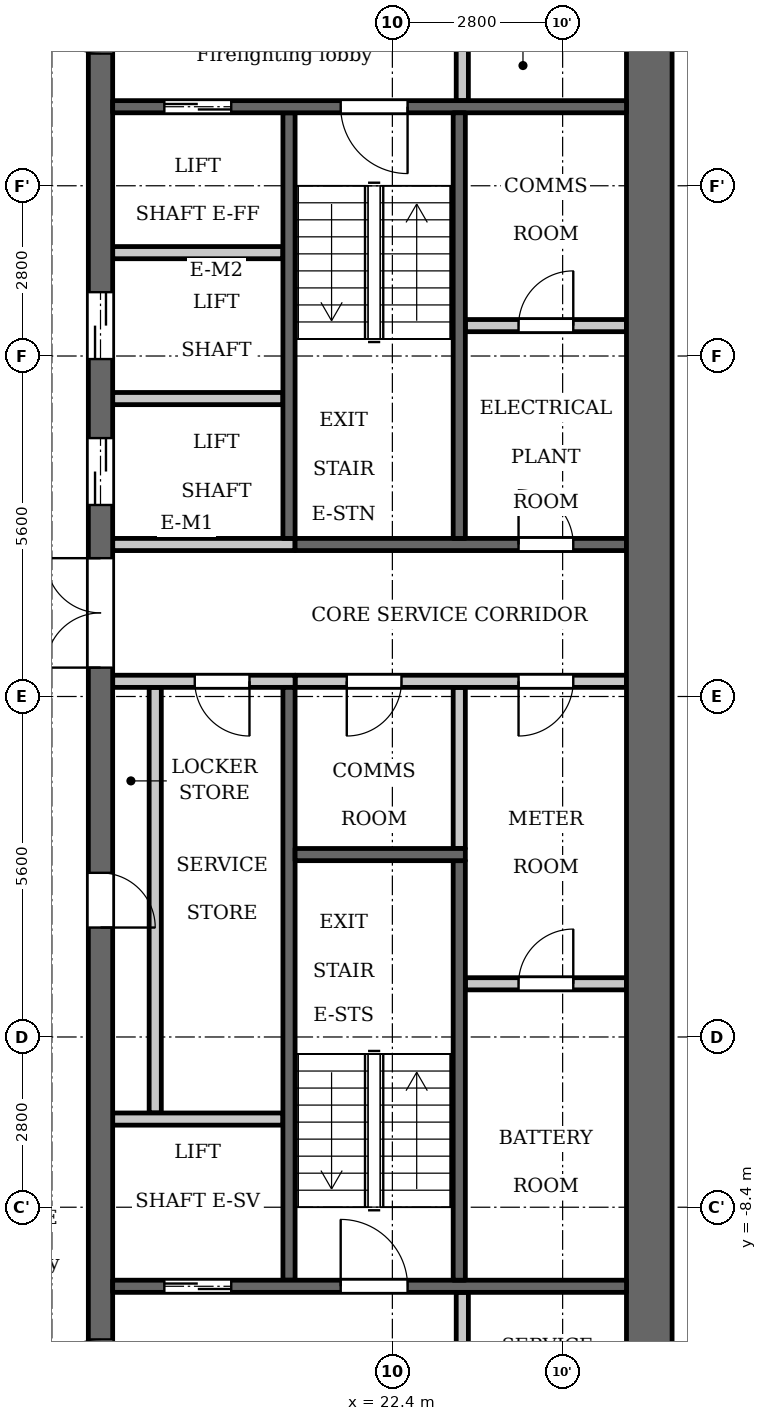
"""IFC4 building model, lengths in metres.
Left out: names, types, materials, properties, quantities, classifications, styles, units other than length and angle.
Written with IfcOpenShell. Run it as: python <this file> out.ifc"""

import sys

from ifc_helpers import new_model, si_unit, direction, frame, frame_2d, origin, place, context, subcontext, project, spatial, rectangle, extrude, element, fill, save


model = new_model("IFC4")
c1 = context("Model", 3, precision=1e-05, world=origin(), true_north=direction((0.0, 1.0)))
c2 = subcontext(c1, "Body", "Model", "MODEL_VIEW")
j1 = project(units=[si_unit("LENGTHUNIT", "METRE"), si_unit("PLANEANGLEUNIT", "RADIAN")], contexts=[c1])
p1 = place(None, origin())
s1 = spatial("IfcSite", under=j1, at=p1, CompositionType="ELEMENT")
p2 = place(p1, origin())
s2 = spatial("IfcBuilding", under=s1, at=p2, CompositionType="ELEMENT")
p3 = place(p2, frame((0.0, 0.0, 160.6)))
s3 = spatial("IfcBuildingStorey", under=s2, at=p3, CompositionType="ELEMENT", Elevation=160.6)
p4 = place(p3, frame((23.5, -2.5, 0.0), z_axis=(0.0, 0.0, 1.0), x_axis=(0.0, 1.0, 0.0)))
e1 = element("IfcWall", 1, at=p4, inside=s3, PredefinedType="PARTITIONING", context=c2, shape_type="SweptSolid", body=[
    extrude(rectangle(XDim=2.65, YDim=0.2, at=frame_2d((1.325, 0.0))), origin(), (0.0, 0.0, 1.0), 3.2),
])
p5 = place(p3, frame((20.7, 2.6, 0.0), z_axis=(0.0, 0.0, 1.0), x_axis=(0.0, 1.0, 0.0)))
e2 = element("IfcWall", 2, at=p5, inside=s3, PredefinedType="SHEAR", context=c2, shape_type="SweptSolid", body=[
    extrude(rectangle(XDim=7.0, YDim=0.2, at=frame_2d((3.5, 0.0))), origin(), (0.0, 0.0, 1.0), 3.2),
])
p6 = place(p3, frame((20.7, -9.6, 0.0), z_axis=(0.0, 0.0, 1.0), x_axis=(0.0, 1.0, 0.0)))
e3 = element("IfcWall", 3, at=p6, inside=s3, PredefinedType="SHEAR", context=c2, shape_type="SweptSolid", body=[
    extrude(rectangle(XDim=9.75, YDim=0.2, at=frame_2d((4.875, 0.0))), origin(), (0.0, 0.0, 1.0), 3.2),
])
p7 = place(p3, frame((20.8, 2.5, 0.0), z_axis=(0.0, 0.0, 1.0), x_axis=(1.0, 0.0, 0.0)))
e4 = element("IfcWall", 4, at=p7, inside=s3, PredefinedType="SHEAR", context=c2, shape_type="SweptSolid", body=[
    extrude(rectangle(XDim=5.45, YDim=0.2, at=frame_2d((2.725, 0.0))), origin(), (0.0, 0.0, 1.0), 3.2),
])
p8 = place(p7, frame((3.675, 0.0, 0.0)))
e5 = element("IfcOpeningElement", 5, at=p8, cuts=e4, PredefinedType="OPENING", context=c2, shape_type="SweptSolid", body=[
    extrude(rectangle(XDim=0.9, YDim=2.1, at=frame_2d((0.45, 1.05))), frame((0.0, 0.11, 0.0), z_axis=(0.0, -1.0, 0.0), x_axis=(1.0, 0.0, 0.0)), (0.0, 0.0, 1.0), 0.22),
])
p9 = place(p3, frame((20.8, 0.25, 0.0), z_axis=(0.0, 0.0, 1.0), x_axis=(1.0, 0.0, 0.0)))
e6 = element("IfcWall", 6, at=p9, inside=s3, PredefinedType="PARTITIONING", context=c2, shape_type="SweptSolid", body=[
    extrude(rectangle(XDim=5.45, YDim=0.2, at=frame_2d((2.725, 0.0))), origin(), (0.0, 0.0, 1.0), 3.2),
])
p10 = place(p9, frame((0.85, 0.0, 0.0)))
e7 = element("IfcOpeningElement", 7, at=p10, cuts=e6, PredefinedType="OPENING", context=c2, shape_type="SweptSolid", body=[
    extrude(rectangle(XDim=0.9, YDim=2.1, at=frame_2d((0.45, 1.05))), frame((0.0, 0.11, 0.0), z_axis=(0.0, -1.0, 0.0), x_axis=(1.0, 0.0, 0.0)), (0.0, 0.0, 1.0), 0.22),
])
p11 = place(p9, frame((3.675, 0.0, 0.0)))
e8 = element("IfcOpeningElement", 8, at=p11, cuts=e6, PredefinedType="OPENING", context=c2, shape_type="SweptSolid", body=[
    extrude(rectangle(XDim=0.9, YDim=2.1, at=frame_2d((0.45, 1.05))), frame((0.0, 0.11, 0.0), z_axis=(0.0, -1.0, 0.0), x_axis=(1.0, 0.0, 0.0)), (0.0, 0.0, 1.0), 0.22),
])
p12 = place(p3, frame((18.5, -6.85, 0.0), z_axis=(0.0, 0.0, 1.0), x_axis=(0.0, 1.0, 0.0)))
e9 = element("IfcWall", 9, at=p12, inside=s3, PredefinedType="PARTITIONING", context=c2, shape_type="SweptSolid", body=[
    extrude(rectangle(XDim=7.0, YDim=0.2, at=frame_2d((3.5, 0.0))), origin(), (0.0, 0.0, 1.0), 3.2),
])
p13 = place(p3, frame((17.6, -12.45, 0.0), z_axis=(0.0, 0.0, 1.0), x_axis=(0.0, 1.0, 0.0)))
e10 = element("IfcWall", 10, at=p13, inside=s3, PredefinedType="SHEAR", context=c2, shape_type="SweptSolid", body=[
    extrude(rectangle(XDim=24.9, YDim=0.4, at=frame_2d((12.45, 0.0))), origin(), (0.0, 0.0, 1.0), 3.2),
])
p14 = place(p13, frame((8.65, 0.0, 0.0)))
e11 = element("IfcOpeningElement", 11, at=p14, cuts=e10, PredefinedType="OPENING", context=c2, shape_type="SweptSolid", body=[
    extrude(rectangle(XDim=0.9, YDim=2.1, at=frame_2d((0.45, 1.05))), frame((0.0, 0.21, 0.0), z_axis=(0.0, -1.0, 0.0), x_axis=(1.0, 0.0, 0.0)), (0.0, 0.0, 1.0), 0.42),
])
p15 = place(p13, frame((15.6, 0.0, 0.0)))
e12 = element("IfcOpeningElement", 12, at=p15, cuts=e10, PredefinedType="OPENING", context=c2, shape_type="SweptSolid", body=[
    extrude(rectangle(XDim=1.1, YDim=2.1, at=frame_2d((0.55, 1.05))), frame((0.0, 0.21, 0.0), z_axis=(0.0, -1.0, 0.0), x_axis=(1.0, 0.0, 0.0)), (0.0, 0.0, 1.0), 0.42),
])
p16 = place(p13, frame((18.0, 0.0, 0.0)))
e13 = element("IfcOpeningElement", 13, at=p16, cuts=e10, PredefinedType="OPENING", context=c2, shape_type="SweptSolid", body=[
    extrude(rectangle(XDim=1.1, YDim=2.1, at=frame_2d((0.55, 1.05))), frame((0.0, 0.21, 0.0), z_axis=(0.0, -1.0, 0.0), x_axis=(1.0, 0.0, 0.0)), (0.0, 0.0, 1.0), 0.42),
])
p17 = place(p13, frame((23.025, 0.0, 0.0)))
e14 = element("IfcOpeningElement", 14, at=p17, cuts=e10, PredefinedType="OPENING", context=c2, shape_type="SweptSolid", body=[
    extrude(rectangle(XDim=1.1, YDim=2.1, at=frame_2d((0.55, 1.05))), frame((0.0, 0.21, 0.0), z_axis=(0.0, -1.0, 0.0), x_axis=(1.0, 0.0, 0.0)), (0.0, 0.0, 1.0), 0.42),
])
p18 = place(p13, frame((0.775, 0.0, 0.0)))
e15 = element("IfcOpeningElement", 15, at=p18, cuts=e10, PredefinedType="OPENING", context=c2, shape_type="SweptSolid", body=[
    extrude(rectangle(XDim=1.1, YDim=2.1, at=frame_2d((0.55, 1.05))), frame((0.0, 0.21, 0.0), z_axis=(0.0, -1.0, 0.0), x_axis=(1.0, 0.0, 0.0)), (0.0, 0.0, 1.0), 0.42),
])
p19 = place(p13, frame((12.925, 0.0, 0.0)))
e16 = element("IfcOpeningElement", 16, at=p19, cuts=e10, PredefinedType="OPENING", context=c2, shape_type="SweptSolid", body=[
    extrude(rectangle(XDim=1.8, YDim=2.1, at=frame_2d((0.9, 1.05))), frame((0.0, 0.21, 0.0), z_axis=(0.0, -1.0, 0.0), x_axis=(1.0, 0.0, 0.0)), (0.0, 0.0, 1.0), 0.42),
])
p20 = place(p3, frame((26.625, -12.45, 0.0), z_axis=(0.0, 0.0, 1.0), x_axis=(0.0, 1.0, 0.0)))
e17 = element("IfcWall", 17, at=p20, inside=s3, PredefinedType="SHEAR", context=c2, shape_type="SweptSolid", body=[
    extrude(rectangle(XDim=24.9, YDim=0.75, at=frame_2d((12.45, 0.0))), origin(), (0.0, 0.0, 1.0), 3.2),
])
p21 = place(p3, frame((23.55, 9.8, 0.0), z_axis=(0.0, 0.0, 1.0), x_axis=(0.0, 1.0, 0.0)))
e18 = element("IfcWall", 18, at=p21, inside=s3, PredefinedType="PARTITIONING", context=c2, shape_type="SweptSolid", body=[
    extrude(rectangle(XDim=2.65, YDim=0.2, at=frame_2d((1.325, 0.0))), origin(), (0.0, 0.0, 1.0), 3.2),
])
p22 = place(p21, frame((0.875, 0.0, 0.0)))
e19 = element("IfcOpeningElement", 19, at=p22, cuts=e18, PredefinedType="OPENING", context=c2, shape_type="SweptSolid", body=[
    extrude(rectangle(XDim=0.9, YDim=2.1, at=frame_2d((0.45, 1.05))), frame((0.0, 0.11, 0.0), z_axis=(0.0, -1.0, 0.0), x_axis=(1.0, 0.0, 0.0)), (0.0, 0.0, 1.0), 0.22),
])
p23 = place(p3, frame((23.55, -12.45, 0.0), z_axis=(0.0, 0.0, 1.0), x_axis=(0.0, 1.0, 0.0)))
e20 = element("IfcWall", 20, at=p23, inside=s3, PredefinedType="PARTITIONING", context=c2, shape_type="SweptSolid", body=[
    extrude(rectangle(XDim=2.65, YDim=0.2, at=frame_2d((1.325, 0.0))), origin(), (0.0, 0.0, 1.0), 3.2),
])
p24 = place(p23, frame((0.875, 0.0, 0.0)))
e21 = element("IfcOpeningElement", 21, at=p24, cuts=e20, PredefinedType="OPENING", context=c2, shape_type="SweptSolid", body=[
    extrude(rectangle(XDim=0.9, YDim=2.1, at=frame_2d((0.45, 1.05))), frame((0.0, 0.11, 0.0), z_axis=(0.0, -1.0, 0.0), x_axis=(1.0, 0.0, 0.0)), (0.0, 0.0, 1.0), 0.22),
])
p25 = place(p3, frame((23.6, -4.725, 0.0), z_axis=(0.0, 0.0, 1.0), x_axis=(1.0, 0.0, 0.0)))
e22 = element("IfcWall", 22, at=p25, inside=s3, PredefinedType="PARTITIONING", context=c2, shape_type="SweptSolid", body=[
    extrude(rectangle(XDim=2.65, YDim=0.2, at=frame_2d((1.325, 0.0))), origin(), (0.0, 0.0, 1.0), 3.2),
])
p26 = place(p25, frame((0.875, 0.0, 0.0)))
e23 = element("IfcOpeningElement", 23, at=p26, cuts=e22, PredefinedType="OPENING", context=c2, shape_type="SweptSolid", body=[
    extrude(rectangle(XDim=0.9, YDim=2.1, at=frame_2d((0.45, 1.05))), frame((0.0, 0.11, 0.0), z_axis=(0.0, -1.0, 0.0), x_axis=(1.0, 0.0, 0.0)), (0.0, 0.0, 1.0), 0.22),
])
p27 = place(p3, frame((23.6, 6.1, 0.0), z_axis=(0.0, 0.0, 1.0), x_axis=(1.0, 0.0, 0.0)))
e24 = element("IfcWall", 24, at=p27, inside=s3, PredefinedType="PARTITIONING", context=c2, shape_type="SweptSolid", body=[
    extrude(rectangle(XDim=2.65, YDim=0.2, at=frame_2d((1.325, 0.0))), origin(), (0.0, 0.0, 1.0), 3.2),
])
p28 = place(p27, frame((0.875, 0.0, 0.0)))
e25 = element("IfcOpeningElement", 25, at=p28, cuts=e24, PredefinedType="OPENING", context=c2, shape_type="SweptSolid", body=[
    extrude(rectangle(XDim=0.9, YDim=2.1, at=frame_2d((0.45, 1.05))), frame((0.0, 0.11, 0.0), z_axis=(0.0, -1.0, 0.0), x_axis=(1.0, 0.0, 0.0)), (0.0, 0.0, 1.0), 0.22),
])
p29 = place(p3, frame((17.8, -9.7, 0.0), z_axis=(0.0, 0.0, 1.0), x_axis=(1.0, 0.0, 0.0)))
e26 = element("IfcWall", 26, at=p29, inside=s3, PredefinedType="SHEAR", context=c2, shape_type="SweptSolid", body=[
    extrude(rectangle(XDim=8.45, YDim=0.2, at=frame_2d((4.225, 0.0))), origin(), (0.0, 0.0, 1.0), 3.2),
])
p30 = place(p29, frame((0.85, 0.0, 0.0)))
e27 = element("IfcOpeningElement", 27, at=p30, cuts=e26, PredefinedType="OPENING", context=c2, shape_type="SweptSolid", body=[
    extrude(rectangle(XDim=1.1, YDim=2.1, at=frame_2d((0.55, 1.05))), frame((0.0, 0.11, 0.0), z_axis=(0.0, -1.0, 0.0), x_axis=(1.0, 0.0, 0.0)), (0.0, 0.0, 1.0), 0.22),
])
p31 = place(p29, frame((3.75, 0.0, 0.0)))
e28 = element("IfcOpeningElement", 28, at=p31, cuts=e26, PredefinedType="OPENING", context=c2, shape_type="SweptSolid", body=[
    extrude(rectangle(XDim=1.1, YDim=2.1, at=frame_2d((0.55, 1.05))), frame((0.0, 0.11, 0.0), z_axis=(0.0, -1.0, 0.0), x_axis=(1.0, 0.0, 0.0)), (0.0, 0.0, 1.0), 0.22),
])
p32 = place(p3, frame((17.8, -6.95, 0.0), z_axis=(0.0, 0.0, 1.0), x_axis=(1.0, 0.0, 0.0)))
e29 = element("IfcWall", 29, at=p32, inside=s3, PredefinedType="PARTITIONING", context=c2, shape_type="SweptSolid", body=[
    extrude(rectangle(XDim=2.8, YDim=0.2, at=frame_2d((1.4, 0.0))), origin(), (0.0, 0.0, 1.0), 3.2),
])
p33 = place(p3, frame((17.8, 0.25, 0.0), z_axis=(0.0, 0.0, 1.0), x_axis=(1.0, 0.0, 0.0)))
e30 = element("IfcWall", 30, at=p33, inside=s3, PredefinedType="PARTITIONING", context=c2, shape_type="SweptSolid", body=[
    extrude(rectangle(XDim=3.0, YDim=0.2, at=frame_2d((1.5, 0.0))), origin(), (0.0, 0.0, 1.0), 3.2),
])
p34 = place(p33, frame((1.35, 0.0, 0.0)))
e31 = element("IfcOpeningElement", 31, at=p34, cuts=e30, PredefinedType="OPENING", context=c2, shape_type="SweptSolid", body=[
    extrude(rectangle(XDim=0.9, YDim=2.1, at=frame_2d((0.45, 1.05))), frame((0.0, 0.11, 0.0), z_axis=(0.0, -1.0, 0.0), x_axis=(1.0, 0.0, 0.0)), (0.0, 0.0, 1.0), 0.22),
])
p35 = place(p3, frame((17.8, 2.5, 0.0), z_axis=(0.0, 0.0, 1.0), x_axis=(1.0, 0.0, 0.0)))
e32 = element("IfcWall", 32, at=p35, inside=s3, PredefinedType="PARTITIONING", context=c2, shape_type="SweptSolid", body=[
    extrude(rectangle(XDim=3.0, YDim=0.2, at=frame_2d((1.5, 0.0))), origin(), (0.0, 0.0, 1.0), 3.2),
])
for number, where, z_axis, x_axis in (
    (33, (17.8, 4.9, 0.0), (0.0, 0.0, 1.0), (1.0, 0.0, 0.0)),
    (34, (17.8, 7.3, 0.0), (0.0, 0.0, 1.0), (1.0, 0.0, 0.0)),
):
    element("IfcWall", number, at=place(p3, frame(where, z_axis=z_axis, x_axis=x_axis)), inside=s3, PredefinedType="PARTITIONING", context=c2, shape_type="SweptSolid", body=[
        extrude(rectangle(XDim=2.8, YDim=0.2, at=frame_2d((1.4, 0.0))), origin(), (0.0, 0.0, 1.0), 3.2),
    ])
p36 = place(p3, frame((17.8, 9.7, 0.0), z_axis=(0.0, 0.0, 1.0), x_axis=(1.0, 0.0, 0.0)))
e35 = element("IfcWall", 35, at=p36, inside=s3, PredefinedType="SHEAR", context=c2, shape_type="SweptSolid", body=[
    extrude(rectangle(XDim=8.45, YDim=0.2, at=frame_2d((4.225, 0.0))), origin(), (0.0, 0.0, 1.0), 3.2),
])
p37 = place(p36, frame((0.85, 0.0, 0.0)))
e36 = element("IfcOpeningElement", 36, at=p37, cuts=e35, PredefinedType="OPENING", context=c2, shape_type="SweptSolid", body=[
    extrude(rectangle(XDim=1.1, YDim=2.1, at=frame_2d((0.55, 1.05))), frame((0.0, 0.11, 0.0), z_axis=(0.0, -1.0, 0.0), x_axis=(1.0, 0.0, 0.0)), (0.0, 0.0, 1.0), 0.22),
])
p38 = place(p36, frame((3.75, 0.0, 0.0)))
e37 = element("IfcOpeningElement", 37, at=p38, cuts=e35, PredefinedType="OPENING", context=c2, shape_type="SweptSolid", body=[
    extrude(rectangle(XDim=1.1, YDim=2.1, at=frame_2d((0.55, 1.05))), frame((0.0, 0.11, 0.0), z_axis=(0.0, -1.0, 0.0), x_axis=(1.0, 0.0, 0.0)), (0.0, 0.0, 1.0), 0.22),
])
p39 = place(p3, frame((23.5, 2.6, 0.0), z_axis=(0.0, 0.0, 1.0), x_axis=(0.0, 1.0, 0.0)))
e38 = element("IfcWall", 38, at=p39, inside=s3, PredefinedType="SHEAR", context=c2, shape_type="SweptSolid", body=[
    extrude(rectangle(XDim=7.0, YDim=0.2, at=frame_2d((3.5, 0.0))), origin(), (0.0, 0.0, 1.0), 3.2),
])
p40 = place(p3, frame((23.5, -9.6, 0.0), z_axis=(0.0, 0.0, 1.0), x_axis=(0.0, 1.0, 0.0)))
e39 = element("IfcWall", 39, at=p40, inside=s3, PredefinedType="SHEAR", context=c2, shape_type="SweptSolid", body=[
    extrude(rectangle(XDim=6.9, YDim=0.2, at=frame_2d((3.45, 0.0))), origin(), (0.0, 0.0, 1.0), 3.2),
])
p41 = place(p3, frame((20.8, -2.6, 0.0), z_axis=(0.0, 0.0, 1.0), x_axis=(1.0, 0.0, 0.0)))
e40 = element("IfcWall", 40, at=p41, inside=s3, PredefinedType="SHEAR", context=c2, shape_type="SweptSolid", body=[
    extrude(rectangle(XDim=2.8, YDim=0.2, at=frame_2d((1.4, 0.0))), origin(), (0.0, 0.0, 1.0), 3.2),
])
p42 = place(p30, origin())
e41 = element("IfcDoor", 41, at=p42, inside=s3, OperationType="DOUBLE_DOOR_SLIDING", PredefinedType="DOOR", context=c2, shape_type="SweptSolid", body=[
    extrude(rectangle(XDim=1.1, YDim=2.1, at=frame_2d((0.55, 1.05))), frame((0.0, 0.025, 0.0), z_axis=(0.0, -1.0, 0.0), x_axis=(1.0, 0.0, 0.0)), (0.0, 0.0, 1.0), 0.05),
])
fill(e27, e41)
p43 = place(p14, origin())
e42 = element("IfcDoor", 42, at=p43, inside=s3, OperationType="SINGLE_SWING_LEFT", PredefinedType="DOOR", context=c2, shape_type="SweptSolid", body=[
    extrude(rectangle(XDim=0.9, YDim=2.1, at=frame_2d((0.45, 1.05))), frame((0.0, 0.025, 0.0), z_axis=(0.0, -1.0, 0.0), x_axis=(1.0, 0.0, 0.0)), (0.0, 0.0, 1.0), 0.05),
])
fill(e11, e42)
p44 = place(p34, origin())
e43 = element("IfcDoor", 43, at=p44, inside=s3, OperationType="SINGLE_SWING_RIGHT", PredefinedType="DOOR", context=c2, shape_type="SweptSolid", body=[
    extrude(rectangle(XDim=0.9, YDim=2.1, at=frame_2d((0.45, 1.05))), frame((0.0, 0.025, 0.0), z_axis=(0.0, -1.0, 0.0), x_axis=(1.0, 0.0, 0.0)), (0.0, 0.0, 1.0), 0.05),
])
fill(e31, e43)
p45 = place(p15, origin())
e44 = element("IfcDoor", 44, at=p45, inside=s3, OperationType="DOUBLE_DOOR_SLIDING", PredefinedType="DOOR", context=c2, shape_type="SweptSolid", body=[
    extrude(rectangle(XDim=1.1, YDim=2.1, at=frame_2d((0.55, 1.05))), frame((0.0, 0.025, 0.0), z_axis=(0.0, -1.0, 0.0), x_axis=(1.0, 0.0, 0.0)), (0.0, 0.0, 1.0), 0.05),
])
fill(e12, e44)
p46 = place(p16, origin())
e45 = element("IfcDoor", 45, at=p46, inside=s3, OperationType="DOUBLE_DOOR_SLIDING", PredefinedType="DOOR", context=c2, shape_type="SweptSolid", body=[
    extrude(rectangle(XDim=1.1, YDim=2.1, at=frame_2d((0.55, 1.05))), frame((0.0, 0.025, 0.0), z_axis=(0.0, -1.0, 0.0), x_axis=(1.0, 0.0, 0.0)), (0.0, 0.0, 1.0), 0.05),
])
fill(e13, e45)
p47 = place(p37, origin())
e46 = element("IfcDoor", 46, at=p47, inside=s3, OperationType="DOUBLE_DOOR_SLIDING", PredefinedType="DOOR", context=c2, shape_type="SweptSolid", body=[
    extrude(rectangle(XDim=1.1, YDim=2.1, at=frame_2d((0.55, 1.05))), frame((0.0, 0.025, 0.0), z_axis=(0.0, -1.0, 0.0), x_axis=(1.0, 0.0, 0.0)), (0.0, 0.0, 1.0), 0.05),
])
fill(e36, e46)
p48 = place(p17, origin())
e47 = element("IfcDoor", 47, at=p48, inside=s3, OperationType="SINGLE_SWING_LEFT", PredefinedType="DOOR", context=c2, shape_type="SweptSolid", body=[
    extrude(rectangle(XDim=1.1, YDim=2.1, at=frame_2d((0.55, 1.05))), frame((0.0, 0.025, 0.0), z_axis=(0.0, -1.0, 0.0), x_axis=(1.0, 0.0, 0.0)), (0.0, 0.0, 1.0), 0.05),
])
fill(e14, e47)
p49 = place(p18, origin())
e48 = element("IfcDoor", 48, at=p49, inside=s3, OperationType="SINGLE_SWING_RIGHT", PredefinedType="DOOR", context=c2, shape_type="SweptSolid", body=[
    extrude(rectangle(XDim=1.1, YDim=2.1, at=frame_2d((0.55, 1.05))), frame((0.0, 0.025, 0.0), z_axis=(0.0, -1.0, 0.0), x_axis=(1.0, 0.0, 0.0)), (0.0, 0.0, 1.0), 0.05),
])
fill(e15, e48)
p50 = place(p38, origin())
e49 = element("IfcDoor", 49, at=p50, inside=s3, OperationType="SINGLE_SWING_RIGHT", PredefinedType="DOOR", context=c2, shape_type="SweptSolid", body=[
    extrude(rectangle(XDim=1.1, YDim=2.1, at=frame_2d((0.55, 1.05))), frame((0.0, 0.025, 0.0), z_axis=(0.0, -1.0, 0.0), x_axis=(1.0, 0.0, 0.0)), (0.0, 0.0, 1.0), 0.05),
])
fill(e37, e49)
p51 = place(p31, origin())
e50 = element("IfcDoor", 50, at=p51, inside=s3, OperationType="SINGLE_SWING_RIGHT", PredefinedType="DOOR", context=c2, shape_type="SweptSolid", body=[
    extrude(rectangle(XDim=1.1, YDim=2.1, at=frame_2d((0.55, 1.05))), frame((0.0, 0.025, 0.0), z_axis=(0.0, -1.0, 0.0), x_axis=(1.0, 0.0, 0.0)), (0.0, 0.0, 1.0), 0.05),
])
fill(e28, e50)
p52 = place(p19, origin())
e51 = element("IfcDoor", 51, at=p52, inside=s3, OperationType="DOUBLE_DOOR_SINGLE_SWING", PredefinedType="DOOR", context=c2, shape_type="SweptSolid", body=[
    extrude(rectangle(XDim=1.8, YDim=2.1, at=frame_2d((0.9, 1.05))), frame((0.0, 0.025, 0.0), z_axis=(0.0, -1.0, 0.0), x_axis=(1.0, 0.0, 0.0)), (0.0, 0.0, 1.0), 0.05),
])
fill(e16, e51)
p53 = place(p10, origin())
e52 = element("IfcDoor", 52, at=p53, inside=s3, OperationType="SINGLE_SWING_LEFT", PredefinedType="DOOR", context=c2, shape_type="SweptSolid", body=[
    extrude(rectangle(XDim=0.9, YDim=2.1, at=frame_2d((0.45, 1.05))), frame((0.0, 0.025, 0.0), z_axis=(0.0, -1.0, 0.0), x_axis=(1.0, 0.0, 0.0)), (0.0, 0.0, 1.0), 0.05),
])
fill(e7, e52)
p54 = place(p26, origin())
e53 = element("IfcDoor", 53, at=p54, inside=s3, OperationType="SINGLE_SWING_LEFT", PredefinedType="DOOR", context=c2, shape_type="SweptSolid", body=[
    extrude(rectangle(XDim=0.9, YDim=2.1, at=frame_2d((0.45, 1.05))), frame((0.0, 0.025, 0.0), z_axis=(0.0, -1.0, 0.0), x_axis=(1.0, 0.0, 0.0)), (0.0, 0.0, 1.0), 0.05),
])
fill(e23, e53)
p55 = place(p11, origin())
e54 = element("IfcDoor", 54, at=p55, inside=s3, OperationType="SINGLE_SWING_LEFT", PredefinedType="DOOR", context=c2, shape_type="SweptSolid", body=[
    extrude(rectangle(XDim=0.9, YDim=2.1, at=frame_2d((0.45, 1.05))), frame((0.0, 0.025, 0.0), z_axis=(0.0, -1.0, 0.0), x_axis=(1.0, 0.0, 0.0)), (0.0, 0.0, 1.0), 0.05),
])
fill(e8, e54)
p56 = place(p28, origin())
e55 = element("IfcDoor", 55, at=p56, inside=s3, OperationType="SINGLE_SWING_LEFT", PredefinedType="DOOR", context=c2, shape_type="SweptSolid", body=[
    extrude(rectangle(XDim=0.9, YDim=2.1, at=frame_2d((0.45, 1.05))), frame((0.0, 0.025, 0.0), z_axis=(0.0, -1.0, 0.0), x_axis=(1.0, 0.0, 0.0)), (0.0, 0.0, 1.0), 0.05),
])
fill(e25, e55)
p57 = place(p8, origin())
e56 = element("IfcDoor", 56, at=p57, inside=s3, OperationType="SINGLE_SWING_RIGHT", PredefinedType="DOOR", context=c2, shape_type="SweptSolid", body=[
    extrude(rectangle(XDim=0.9, YDim=2.1, at=frame_2d((0.45, 1.05))), frame((0.0, 0.025, 0.0), z_axis=(0.0, -1.0, 0.0), x_axis=(1.0, 0.0, 0.0)), (0.0, 0.0, 1.0), 0.05),
])
fill(e5, e56)
save(model, sys.argv[1])
